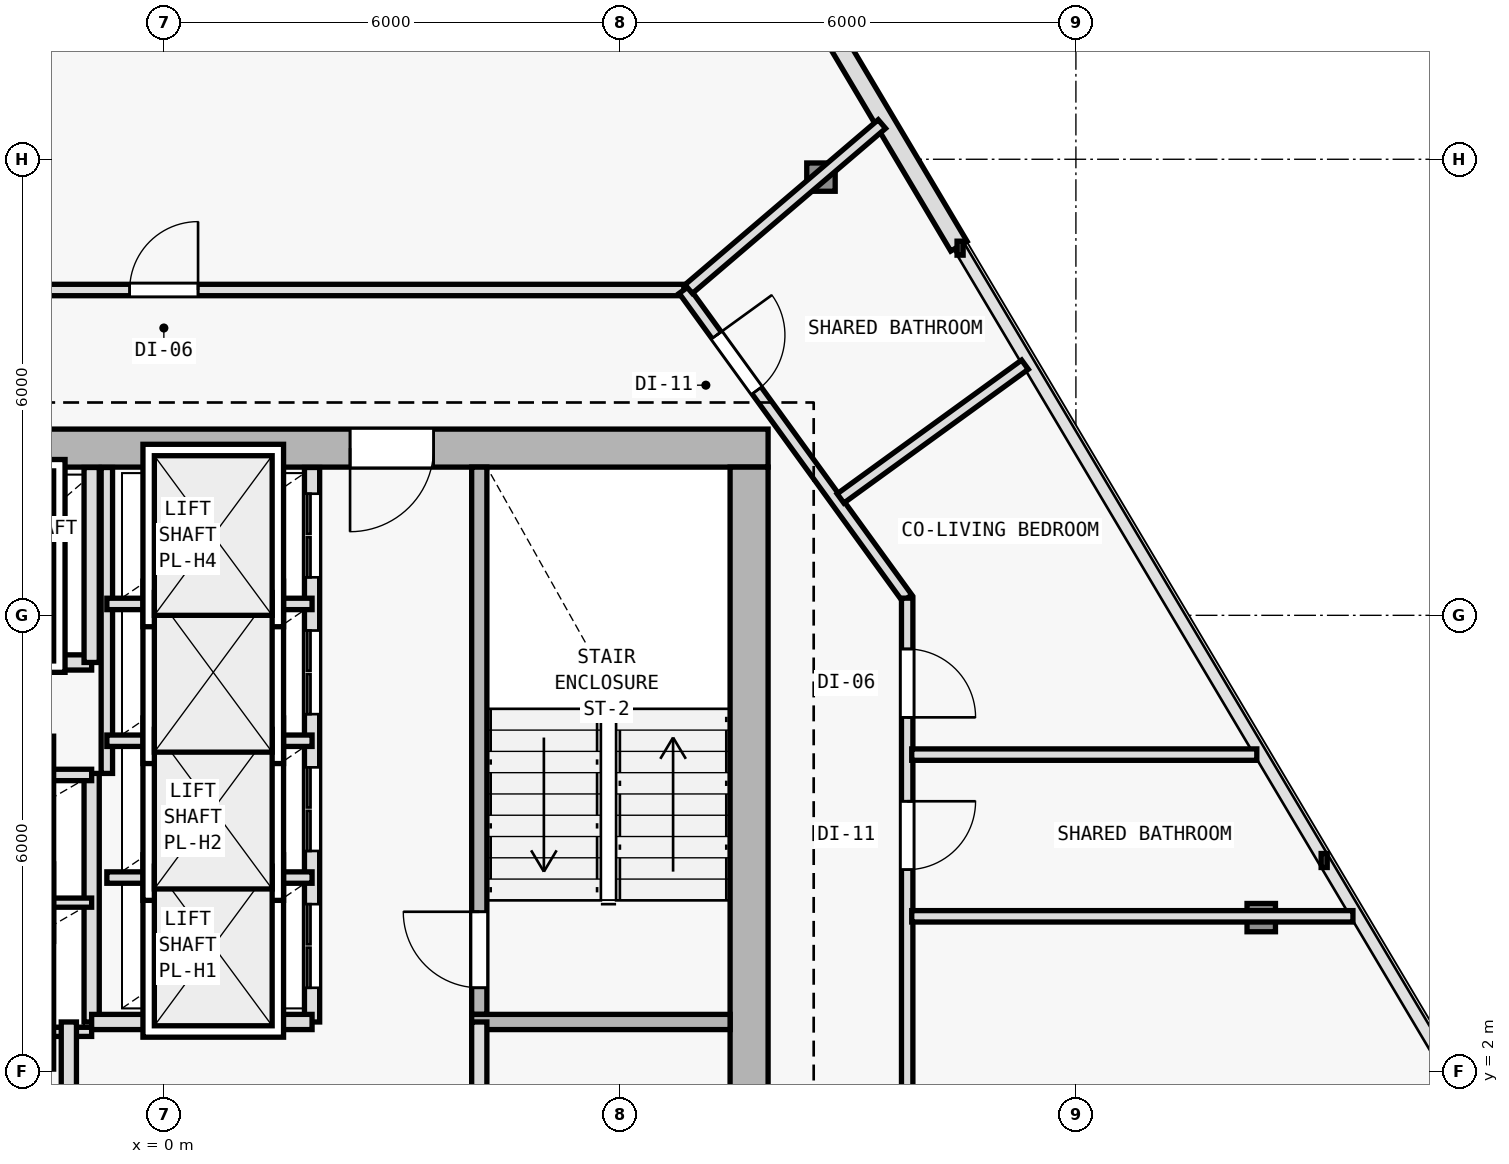
"""IFC4 building model, lengths in metres.
Left out: names, types, materials, properties, quantities, classifications, styles, units other than length and angle.
Written with IfcOpenShell. Run it as: python <this file> out.ifc"""

import sys

from ifc_helpers import new_model, si_unit, direction, frame, frame_2d, origin, origin_2d, place, context, subcontext, project, spatial, rectangle, i_section, extrude, element, fill, save


model = new_model("IFC4")
c1 = context("Model", 3, precision=1e-05, world=origin(), true_north=direction((0.0, 1.0)))
c2 = subcontext(c1, "Body", "Model", "MODEL_VIEW")
j1 = project(units=[si_unit("LENGTHUNIT", "METRE"), si_unit("PLANEANGLEUNIT", "RADIAN")], contexts=[c1])
p1 = place(None, origin())
s1 = spatial("IfcSite", under=j1, at=p1, CompositionType="ELEMENT")
p2 = place(p1, origin())
s2 = spatial("IfcBuilding", under=s1, at=p2, CompositionType="ELEMENT")
p3 = place(p2, frame((0.0, 0.0, 223.5)))
s3 = spatial("IfcBuildingStorey", under=s2, at=p3, CompositionType="ELEMENT", Elevation=223.5)
p4 = place(p3, frame((7.7, 10.2, 0.0), z_axis=(0.0, 0.0, 1.0), x_axis=(1.0, 0.0, 0.0)))
e1 = element("IfcColumn", 1, at=p4, inside=s3, PredefinedType="COLUMN", context=c2, shape_type="SweptSolid", body=[
    extrude(i_section(OverallWidth=0.398, OverallDepth=0.387, WebThickness=0.013, FlangeThickness=0.022, FilletRadius=0.015, at=origin_2d()), origin(), (0.0, 0.0, 1.0), 3.6),
])
p5 = place(p3, frame((14.438, 4.023, 0.006), z_axis=(-0.018907326549, 0.00952167524, 0.999775900241), x_axis=(-0.449781931574, -0.893138406984, 0.0)))
e2 = element("IfcColumn", 2, at=p5, inside=s3, PredefinedType="COLUMN", context=c2, shape_type="SweptSolid", body=[
    extrude(i_section(OverallWidth=0.374, OverallDepth=0.372, WebThickness=0.012, FlangeThickness=0.02, FilletRadius=0.015, at=origin_2d()), origin(), (0.0, 0.0, 1.0), 3.59),
])
p6 = place(p3, frame((8.646, 13.765, 0.006), z_axis=(-0.011767853257, -0.00258484638, 0.999927415465), x_axis=(0.214538664031, -0.976715496773, 0.0)))
e3 = element("IfcColumn", 3, at=p6, inside=s3, PredefinedType="COLUMN", context=c2, shape_type="SweptSolid", body=[
    extrude(i_section(OverallWidth=0.374, OverallDepth=0.372, WebThickness=0.012, FlangeThickness=0.02, FilletRadius=0.015, at=origin_2d()), origin(), (0.0, 0.0, 1.0), 3.589),
])
p7 = place(p3, frame((5.396, 21.375, 0.0), z_axis=(0.0, 0.0, 1.0), x_axis=(0.511082771111, -0.85953150092, 0.0)))
e4 = element("IfcWall", 4, at=p7, inside=s3, PredefinedType="SOLIDWALL", context=c2, shape_type="SweptSolid", body=[
    extrude(rectangle(XDim=9.911, YDim=0.25, at=frame_2d((4.955, 0.0))), origin(), (0.0, 0.0, 1.0), 3.35),
])
p8 = place(p7, frame((4.255, 0.0, 0.62)))
e5 = element("IfcOpeningElement", 5, at=p8, cuts=e4, PredefinedType="OPENING", context=c2, shape_type="SweptSolid", body=[
    extrude(rectangle(XDim=1.4, YDim=2.0, at=frame_2d((0.7, 1.0))), frame((0.0, 0.135, 0.0), z_axis=(0.0, -1.0, 0.0), x_axis=(1.0, 0.0, 0.0)), (0.0, 0.0, 1.0), 0.27),
])
p9 = place(p3, frame((7.95, 10.2, 0.0), z_axis=(0.0, 0.0, 1.0), x_axis=(-1.0, 0.0, 0.0)))
e6 = element("IfcWall", 6, at=p9, inside=s3, PredefinedType="SHEAR", context=c2, shape_type="SweptSolid", body=[
    extrude(rectangle(XDim=15.9, YDim=0.5, at=frame_2d((7.95, 0.0))), origin(), (0.0, 0.0, 1.0), 3.35),
])
p10 = place(p9, frame((4.4, 0.0, 0.0)))
e7 = element("IfcOpeningElement", 7, at=p10, cuts=e6, PredefinedType="OPENING", context=c2, shape_type="SweptSolid", body=[
    extrude(rectangle(XDim=1.1, YDim=2.15, at=frame_2d((0.55, 1.075))), frame((0.0, 0.26, 0.0), z_axis=(0.0, -1.0, 0.0), x_axis=(1.0, 0.0, 0.0)), (0.0, 0.0, 1.0), 0.52),
])
p11 = place(p3, frame((7.7, 9.95, 0.0), z_axis=(0.0, 0.0, 1.0), x_axis=(0.0, -1.0, 0.0)))
e8 = element("IfcWall", 8, at=p11, inside=s3, PredefinedType="SHEAR", context=c2, shape_type="SweptSolid", body=[
    extrude(rectangle(XDim=19.1, YDim=0.5, at=frame_2d((9.55, 0.0))), origin(), (0.0, 0.0, 1.0), 3.35),
])
p12 = place(p3, frame((4.15, 2.75, 0.0), z_axis=(0.0, 0.0, 1.0), x_axis=(0.0, 1.0, 0.0)))
e9 = element("IfcWall", 9, at=p12, inside=s3, PredefinedType="SOLIDWALL", context=c2, shape_type="SweptSolid", body=[
    extrude(rectangle(XDim=7.2, YDim=0.2, at=frame_2d((3.6, 0.0))), origin(), (0.0, 0.0, 1.0), 3.35),
])
p13 = place(p12, frame((0.35, 0.0, 0.0)))
e10 = element("IfcOpeningElement", 10, at=p13, cuts=e9, PredefinedType="OPENING", context=c2, shape_type="SweptSolid", body=[
    extrude(rectangle(XDim=1.0, YDim=2.15, at=frame_2d((0.5, 1.075))), frame((0.0, 0.11, 0.0), z_axis=(0.0, -1.0, 0.0), x_axis=(1.0, 0.0, 0.0)), (0.0, 0.0, 1.0), 0.22),
])
p14 = place(p3, frame((4.05, 2.65, 0.0), z_axis=(0.0, 0.0, 1.0), x_axis=(1.0, 0.0, 0.0)))
e11 = element("IfcWall", 11, at=p14, inside=s3, PredefinedType="SOLIDWALL", context=c2, shape_type="SweptSolid", body=[
    extrude(rectangle(XDim=3.4, YDim=0.2, at=frame_2d((1.7, 0.0))), origin(), (0.0, 0.0, 1.0), 3.35),
])
p15 = place(p3, frame((-0.95, 2.65, 0.0), z_axis=(0.0, 0.0, 1.0), x_axis=(0.0, 1.0, 0.0)))
e12 = element("IfcWall", 12, at=p15, inside=s3, PredefinedType="SOLIDWALL", context=c2, shape_type="SweptSolid", body=[
    extrude(rectangle(XDim=3.27, YDim=0.2, at=frame_2d((1.635, 0.0))), origin(), (0.0, 0.0, 1.0), 3.35),
])
for number, where, z_axis, x_axis in (
    (13, (-3.85, 2.52, 0.0), (0.0, 0.0, 1.0), (1.0, 0.0, 0.0)),
    (14, (-3.85, 4.22, 0.0), (0.0, 0.0, 1.0), (1.0, 0.0, 0.0)),
):
    element("IfcWall", number, at=place(p3, frame(where, z_axis=z_axis, x_axis=x_axis)), inside=s3, PredefinedType="PARTITIONING", context=c2, shape_type="SweptSolid", body=[
        extrude(rectangle(XDim=2.9, YDim=0.12, at=frame_2d((1.45, 0.0))), origin(), (0.0, 0.0, 1.0), 3.35),
    ])
p16 = place(p3, frame((-3.85, 5.9, 0.0), z_axis=(0.0, 0.0, 1.0), x_axis=(1.0, 0.0, 0.0)))
e15 = element("IfcWall", 15, at=p16, inside=s3, PredefinedType="PARTITIONING", context=c2, shape_type="SweptSolid", body=[
    extrude(rectangle(XDim=2.9, YDim=0.15, at=frame_2d((1.45, 0.0))), origin(), (0.0, 0.0, 1.0), 3.35),
])
p17 = place(p3, frame((-3.85, 7.38, 0.0), z_axis=(0.0, 0.0, 1.0), x_axis=(1.0, 0.0, 0.0)))
e16 = element("IfcWall", 16, at=p17, inside=s3, PredefinedType="SOLIDWALL", context=c2, shape_type="SweptSolid", body=[
    extrude(rectangle(XDim=2.9, YDim=0.2, at=frame_2d((1.45, 0.0))), origin(), (0.0, 0.0, 1.0), 3.35),
])
p18 = place(p17, frame((0.85, 0.0, 0.0)))
e17 = element("IfcOpeningElement", 17, at=p18, cuts=e16, PredefinedType="OPENING", context=c2, shape_type="SweptSolid", body=[
    extrude(rectangle(XDim=1.2, YDim=2.2, at=frame_2d((0.6, 1.1))), frame((0.0, 0.11, 0.0), z_axis=(0.0, -1.0, 0.0), x_axis=(1.0, 0.0, 0.0)), (0.0, 0.0, 1.0), 0.22),
])
p19 = place(p3, frame((-0.95, 7.38, 0.0), z_axis=(0.0, 0.0, 1.0), x_axis=(0.0, 1.0, 0.0)))
e18 = element("IfcWall", 18, at=p19, inside=s3, PredefinedType="SOLIDWALL", context=c2, shape_type="SweptSolid", body=[
    extrude(rectangle(XDim=2.565, YDim=0.2, at=frame_2d((1.283, 0.0))), origin(), (0.0, 0.0, 1.0), 3.35),
])
p20 = place(p3, frame((4.15, -6.05, 0.0), z_axis=(0.0, 0.0, 1.0), x_axis=(0.0, 1.0, 0.0)))
e19 = element("IfcWall", 19, at=p20, inside=s3, PredefinedType="SOLIDWALL", context=c2, shape_type="SweptSolid", body=[
    extrude(rectangle(XDim=8.7, YDim=0.2, at=frame_2d((4.35, 0.0))), origin(), (0.0, 0.0, 1.0), 3.35),
])
p21 = place(p20, frame((3.6, 0.0, 0.0)))
e20 = element("IfcOpeningElement", 20, at=p21, cuts=e19, PredefinedType="OPENING", context=c2, shape_type="SweptSolid", body=[
    extrude(rectangle(XDim=0.95, YDim=2.1, at=frame_2d((0.475, 1.05))), frame((0.0, 0.11, 0.0), z_axis=(0.0, -1.0, 0.0), x_axis=(1.0, 0.0, 0.0)), (0.0, 0.0, 1.0), 0.22),
])
p22 = place(p3, frame((-1.25, -6.05, 0.0), z_axis=(0.0, 0.0, 1.0), x_axis=(0.0, 1.0, 0.0)))
e21 = element("IfcWall", 21, at=p22, inside=s3, PredefinedType="SOLIDWALL", context=c2, shape_type="SweptSolid", body=[
    extrude(rectangle(XDim=8.7, YDim=0.2, at=frame_2d((4.35, 0.0))), origin(), (0.0, 0.0, 1.0), 3.35),
])
p23 = place(p22, frame((3.4, 0.0, 0.0)))
e22 = element("IfcOpeningElement", 22, at=p23, cuts=e21, PredefinedType="OPENING", context=c2, shape_type="SweptSolid", body=[
    extrude(rectangle(XDim=0.95, YDim=2.1, at=frame_2d((0.475, 1.05))), frame((0.0, 0.11, 0.0), z_axis=(0.0, -1.0, 0.0), x_axis=(1.0, 0.0, 0.0)), (0.0, 0.0, 1.0), 0.22),
])
p24 = place(p3, frame((1.95, 2.65, 0.0), z_axis=(0.0, 0.0, 1.0), x_axis=(0.0, 1.0, 0.0)))
e23 = element("IfcWall", 23, at=p24, inside=s3, PredefinedType="SOLIDWALL", context=c2, shape_type="SweptSolid", body=[
    extrude(rectangle(XDim=7.295, YDim=0.2, at=frame_2d((3.647, 0.0))), origin(), (0.0, 0.0, 1.0), 3.35),
])
p25 = place(p24, frame((0.45, 0.0, 0.0)))
e24 = element("IfcOpeningElement", 24, at=p25, cuts=e23, PredefinedType="OPENING", context=c2, shape_type="SweptSolid", body=[
    extrude(rectangle(XDim=1.1, YDim=2.15, at=frame_2d((0.55, 1.075))), frame((0.0, 0.11, 0.0), z_axis=(0.0, -1.0, 0.0), x_axis=(1.0, 0.0, 0.0)), (0.0, 0.0, 1.0), 0.22),
])
p26 = place(p24, frame((2.25, 0.0, 0.0)))
e25 = element("IfcOpeningElement", 25, at=p26, cuts=e23, PredefinedType="OPENING", context=c2, shape_type="SweptSolid", body=[
    extrude(rectangle(XDim=1.1, YDim=2.15, at=frame_2d((0.55, 1.075))), frame((0.0, 0.11, 0.0), z_axis=(0.0, -1.0, 0.0), x_axis=(1.0, 0.0, 0.0)), (0.0, 0.0, 1.0), 0.22),
])
p27 = place(p24, frame((4.05, 0.0, 0.0)))
e26 = element("IfcOpeningElement", 26, at=p27, cuts=e23, PredefinedType="OPENING", context=c2, shape_type="SweptSolid", body=[
    extrude(rectangle(XDim=1.1, YDim=2.15, at=frame_2d((0.55, 1.075))), frame((0.0, 0.11, 0.0), z_axis=(0.0, -1.0, 0.0), x_axis=(1.0, 0.0, 0.0)), (0.0, 0.0, 1.0), 0.22),
])
p28 = place(p24, frame((5.85, 0.0, 0.0)))
e27 = element("IfcOpeningElement", 27, at=p28, cuts=e23, PredefinedType="OPENING", context=c2, shape_type="SweptSolid", body=[
    extrude(rectangle(XDim=1.1, YDim=2.15, at=frame_2d((0.55, 1.075))), frame((0.0, 0.11, 0.0), z_axis=(0.0, -1.0, 0.0), x_axis=(1.0, 0.0, 0.0)), (0.0, 0.0, 1.0), 0.22),
])
p29 = place(p3, frame((-0.95, 2.65, 0.0), z_axis=(0.0, 0.0, 1.0), x_axis=(1.0, 0.0, 0.0)))
e28 = element("IfcWall", 28, at=p29, inside=s3, PredefinedType="SOLIDWALL", context=c2, shape_type="SweptSolid", body=[
    extrude(rectangle(XDim=2.9, YDim=0.2, at=frame_2d((1.45, 0.0))), origin(), (0.0, 0.0, 1.0), 3.35),
])
p30 = place(p3, frame((-0.75, 5.92, 0.0), z_axis=(0.0, 0.0, 1.0), x_axis=(0.0, 1.0, 0.0)))
e29 = element("IfcWall", 29, at=p30, inside=s3, PredefinedType="PARTITIONING", context=c2, shape_type="SweptSolid", body=[
    extrude(rectangle(XDim=4.025, YDim=0.15, at=frame_2d((2.013, 0.0))), origin(), (0.0, 0.0, 1.0), 3.35),
])
for number, where, z_axis, x_axis in (
    (30, (-0.75, 4.55, 0.0), (0.0, 0.0, 1.0), (1.0, 0.0, 0.0)),
    (31, (-0.75, 6.35, 0.0), (0.0, 0.0, 1.0), (1.0, 0.0, 0.0)),
    (32, (-0.75, 8.15, 0.0), (0.0, 0.0, 1.0), (1.0, 0.0, 0.0)),
):
    element("IfcWall", number, at=place(p3, frame(where, z_axis=z_axis, x_axis=x_axis)), inside=s3, PredefinedType="PARTITIONING", context=c2, shape_type="SweptSolid", body=[
        extrude(rectangle(XDim=2.7, YDim=0.15, at=frame_2d((1.35, 0.0))), origin(), (0.0, 0.0, 1.0), 3.35),
    ])
p31 = place(p3, frame((-6.841, 12.28, 0.0), z_axis=(0.0, 0.0, 1.0), x_axis=(1.0, 0.0, 0.0)))
e33 = element("IfcWall", 33, at=p31, inside=s3, PredefinedType="PARTITIONING", context=c2, shape_type="SweptSolid", body=[
    extrude(rectangle(XDim=13.682, YDim=0.15, at=frame_2d((6.841, 0.0))), origin(), (0.0, 0.0, 1.0), 3.005),
])
p32 = place(p31, frame((6.391, 0.0, 0.0)))
e34 = element("IfcOpeningElement", 34, at=p32, cuts=e33, PredefinedType="OPENING", context=c2, shape_type="SweptSolid", body=[
    extrude(rectangle(XDim=0.9, YDim=2.1, at=frame_2d((0.45, 1.05))), frame((0.0, 0.085, 0.0), z_axis=(0.0, -1.0, 0.0), x_axis=(1.0, 0.0, 0.0)), (0.0, 0.0, 1.0), 0.17),
])
p33 = place(p3, frame((6.841, 12.28, 0.0), z_axis=(0.0, 0.0, 1.0), x_axis=(0.586956386413, -0.809618552436, 0.0)))
e35 = element("IfcWall", 35, at=p33, inside=s3, PredefinedType="PARTITIONING", context=c2, shape_type="SweptSolid", body=[
    extrude(rectangle(XDim=5.008, YDim=0.15, at=frame_2d((2.504, 0.0))), origin(), (0.0, 0.0, 1.0), 2.875),
])
p34 = place(p33, frame((0.734, 0.0, 0.0)))
e36 = element("IfcOpeningElement", 36, at=p34, cuts=e35, PredefinedType="OPENING", context=c2, shape_type="SweptSolid", body=[
    extrude(rectangle(XDim=0.9, YDim=2.1, at=frame_2d((0.45, 1.05))), frame((0.0, 0.085, 0.0), z_axis=(0.0, -1.0, 0.0), x_axis=(1.0, 0.0, 0.0)), (0.0, 0.0, 1.0), 0.17),
])
p35 = place(p3, frame((9.78, 8.226, 0.0), z_axis=(0.0, 0.0, 1.0), x_axis=(0.0, -1.0, 0.0)))
e37 = element("IfcWall", 37, at=p35, inside=s3, PredefinedType="PARTITIONING", context=c2, shape_type="SweptSolid", body=[
    extrude(rectangle(XDim=19.706, YDim=0.15, at=frame_2d((9.853, 0.0))), origin(), (0.0, 0.0, 1.0), 2.775),
])
p36 = place(p35, frame((11.407, 0.0, 0.0)))
e38 = element("IfcOpeningElement", 38, at=p36, cuts=e37, PredefinedType="OPENING", context=c2, shape_type="SweptSolid", body=[
    extrude(rectangle(XDim=0.9, YDim=2.1, at=frame_2d((0.45, 1.05))), frame((0.0, 0.085, 0.0), z_axis=(0.0, -1.0, 0.0), x_axis=(1.0, 0.0, 0.0)), (0.0, 0.0, 1.0), 0.17),
])
p37 = place(p35, frame((2.672, 0.0, 0.0)))
e39 = element("IfcOpeningElement", 39, at=p37, cuts=e37, PredefinedType="OPENING", context=c2, shape_type="SweptSolid", body=[
    extrude(rectangle(XDim=0.9, YDim=2.1, at=frame_2d((0.45, 1.05))), frame((0.0, 0.085, 0.0), z_axis=(0.0, -1.0, 0.0), x_axis=(1.0, 0.0, 0.0)), (0.0, 0.0, 1.0), 0.17),
])
p38 = place(p35, frame((0.668, 0.0, 0.0)))
e40 = element("IfcOpeningElement", 40, at=p38, cuts=e37, PredefinedType="OPENING", context=c2, shape_type="SweptSolid", body=[
    extrude(rectangle(XDim=0.9, YDim=2.1, at=frame_2d((0.45, 1.05))), frame((0.0, 0.085, 0.0), z_axis=(0.0, -1.0, 0.0), x_axis=(1.0, 0.0, 0.0)), (0.0, 0.0, 1.0), 0.17),
])
p39 = place(p3, frame((9.84, 4.04, 0.0), z_axis=(0.0, 0.0, 1.0), x_axis=(1.0, 0.0, 0.0)))
e41 = element("IfcWall", 41, at=p39, inside=s3, PredefinedType="PARTITIONING", context=c2, shape_type="SweptSolid", body=[
    extrude(rectangle(XDim=5.805, YDim=0.15, at=frame_2d((2.902, 0.0))), origin(), (0.0, 0.0, 1.0), 2.875),
])
p40 = place(p3, frame((6.905, 12.292, 0.0), z_axis=(0.0, 0.0, 1.0), x_axis=(0.760533713233, 0.649298445274, 0.0)))
e42 = element("IfcWall", 42, at=p40, inside=s3, PredefinedType="PARTITIONING", context=c2, shape_type="SweptSolid", body=[
    extrude(rectangle(XDim=3.343, YDim=0.15, at=frame_2d((1.671, 0.0))), origin(), (0.0, 0.0, 1.0), 2.975),
])
p41 = place(p3, frame((8.903, 9.538, 0.0), z_axis=(0.0, 0.0, 1.0), x_axis=(0.809591090344, 0.586994264397, 0.0)))
e43 = element("IfcWall", 43, at=p41, inside=s3, PredefinedType="PARTITIONING", context=c2, shape_type="SweptSolid", body=[
    extrude(rectangle(XDim=2.998, YDim=0.15, at=frame_2d((1.499, 0.0))), origin(), (0.0, 0.0, 1.0), 2.875),
])
p42 = place(p3, frame((9.84, 6.167, 0.0), z_axis=(0.0, 0.0, 1.0), x_axis=(1.0, 0.0, 0.0)))
e44 = element("IfcWall", 44, at=p42, inside=s3, PredefinedType="PARTITIONING", context=c2, shape_type="SweptSolid", body=[
    extrude(rectangle(XDim=4.54, YDim=0.15, at=frame_2d((2.27, 0.0))), origin(), (0.0, 0.0, 1.0), 2.875),
])
p43 = place(p10, origin())
e45 = element("IfcDoor", 45, at=p43, inside=s3, OperationType="SINGLE_SWING_RIGHT", PredefinedType="DOOR", context=c2, shape_type="SweptSolid", body=[
    extrude(rectangle(XDim=1.1, YDim=2.15, at=frame_2d((0.55, 1.075))), frame((0.0, 0.025, 0.0), z_axis=(0.0, -1.0, 0.0), x_axis=(1.0, 0.0, 0.0)), (0.0, 0.0, 1.0), 0.05),
])
fill(e7, e45)
p44 = place(p13, origin())
e46 = element("IfcDoor", 46, at=p44, inside=s3, OperationType="SINGLE_SWING_RIGHT", PredefinedType="DOOR", context=c2, shape_type="SweptSolid", body=[
    extrude(rectangle(XDim=1.0, YDim=2.15, at=frame_2d((0.5, 1.075))), frame((0.0, 0.025, 0.0), z_axis=(0.0, -1.0, 0.0), x_axis=(1.0, 0.0, 0.0)), (0.0, 0.0, 1.0), 0.05),
])
fill(e10, e46)
p45 = place(p25, origin())
e47 = element("IfcDoor", 47, at=p45, inside=s3, OperationType="DOUBLE_DOOR_SLIDING", PredefinedType="DOOR", context=c2, shape_type="SweptSolid", body=[
    extrude(rectangle(XDim=1.1, YDim=2.15, at=frame_2d((0.55, 1.075))), frame((0.0, 0.025, 0.0), z_axis=(0.0, -1.0, 0.0), x_axis=(1.0, 0.0, 0.0)), (0.0, 0.0, 1.0), 0.05),
])
fill(e24, e47)
p46 = place(p26, origin())
e48 = element("IfcDoor", 48, at=p46, inside=s3, OperationType="DOUBLE_DOOR_SLIDING", PredefinedType="DOOR", context=c2, shape_type="SweptSolid", body=[
    extrude(rectangle(XDim=1.1, YDim=2.15, at=frame_2d((0.55, 1.075))), frame((0.0, 0.025, 0.0), z_axis=(0.0, -1.0, 0.0), x_axis=(1.0, 0.0, 0.0)), (0.0, 0.0, 1.0), 0.05),
])
fill(e25, e48)
p47 = place(p27, origin())
e49 = element("IfcDoor", 49, at=p47, inside=s3, OperationType="DOUBLE_DOOR_SLIDING", PredefinedType="DOOR", context=c2, shape_type="SweptSolid", body=[
    extrude(rectangle(XDim=1.1, YDim=2.15, at=frame_2d((0.55, 1.075))), frame((0.0, 0.025, 0.0), z_axis=(0.0, -1.0, 0.0), x_axis=(1.0, 0.0, 0.0)), (0.0, 0.0, 1.0), 0.05),
])
fill(e26, e49)
p48 = place(p28, origin())
e50 = element("IfcDoor", 50, at=p48, inside=s3, OperationType="DOUBLE_DOOR_SLIDING", PredefinedType="DOOR", context=c2, shape_type="SweptSolid", body=[
    extrude(rectangle(XDim=1.1, YDim=2.15, at=frame_2d((0.55, 1.075))), frame((0.0, 0.025, 0.0), z_axis=(0.0, -1.0, 0.0), x_axis=(1.0, 0.0, 0.0)), (0.0, 0.0, 1.0), 0.05),
])
fill(e27, e50)
p49 = place(p37, origin())
e51 = element("IfcDoor", 51, at=p49, inside=s3, OperationType="SINGLE_SWING_LEFT", PredefinedType="DOOR", context=c2, shape_type="SweptSolid", body=[
    extrude(rectangle(XDim=0.9, YDim=2.1, at=frame_2d((0.45, 1.05))), frame((0.0, 0.025, 0.0), z_axis=(0.0, -1.0, 0.0), x_axis=(1.0, 0.0, 0.0)), (0.0, 0.0, 1.0), 0.05),
])
fill(e39, e51)
p50 = place(p38, origin())
e52 = element("IfcDoor", 52, at=p50, inside=s3, OperationType="SINGLE_SWING_RIGHT", PredefinedType="DOOR", context=c2, shape_type="SweptSolid", body=[
    extrude(rectangle(XDim=0.9, YDim=2.1, at=frame_2d((0.45, 1.05))), frame((0.0, 0.025, 0.0), z_axis=(0.0, -1.0, 0.0), x_axis=(1.0, 0.0, 0.0)), (0.0, 0.0, 1.0), 0.05),
])
fill(e40, e52)
p51 = place(p34, origin())
e53 = element("IfcDoor", 53, at=p51, inside=s3, OperationType="SINGLE_SWING_LEFT", PredefinedType="DOOR", context=c2, shape_type="SweptSolid", body=[
    extrude(rectangle(XDim=0.9, YDim=2.1, at=frame_2d((0.45, 1.05))), frame((0.0, 0.025, 0.0), z_axis=(0.0, -1.0, 0.0), x_axis=(1.0, 0.0, 0.0)), (0.0, 0.0, 1.0), 0.05),
])
fill(e36, e53)
p52 = place(p32, origin())
e54 = element("IfcDoor", 54, at=p52, inside=s3, OperationType="SINGLE_SWING_RIGHT", PredefinedType="DOOR", context=c2, shape_type="SweptSolid", body=[
    extrude(rectangle(XDim=0.9, YDim=2.1, at=frame_2d((0.45, 1.05))), frame((0.0, 0.025, 0.0), z_axis=(0.0, -1.0, 0.0), x_axis=(1.0, 0.0, 0.0)), (0.0, 0.0, 1.0), 0.05),
])
fill(e34, e54)
save(model, sys.argv[1])
